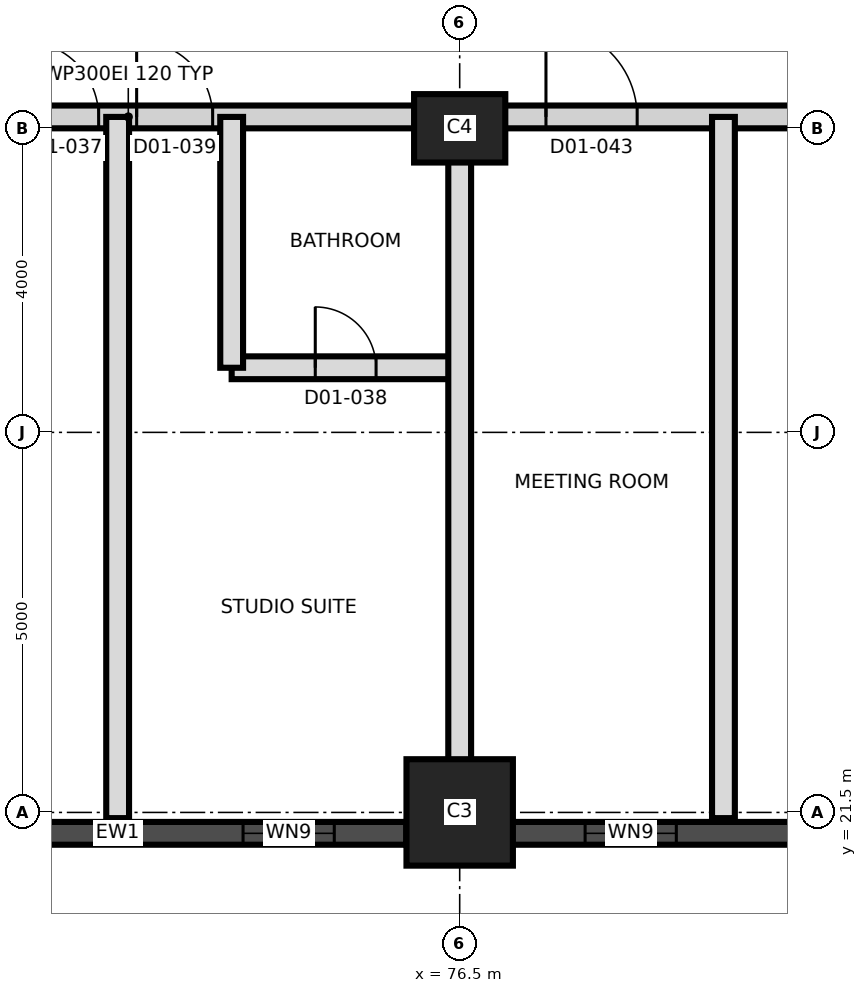
"""IFC4 building model, lengths in metres.
Left out: names, types, materials, properties, quantities, classifications, styles, units other than length and angle.
Written with IfcOpenShell. Run it as: python <this file> out.ifc"""

import sys

from ifc_helpers import new_model, si_unit, direction, frame, frame_2d, origin, origin_2d, place, context, subcontext, project, spatial, rectangle, extrude, element, fill, save


model = new_model("IFC4")
c1 = context("Model", 3, precision=1e-05, world=origin(), true_north=direction((0.0, 1.0)))
c2 = subcontext(c1, "Body", "Model", "MODEL_VIEW")
j1 = project(units=[si_unit("LENGTHUNIT", "METRE"), si_unit("PLANEANGLEUNIT", "RADIAN")], contexts=[c1])
p1 = place(None, origin())
s1 = spatial("IfcSite", under=j1, at=p1, CompositionType="ELEMENT")
p2 = place(p1, origin())
s2 = spatial("IfcBuilding", under=s1, at=p2, CompositionType="ELEMENT")
p3 = place(p2, frame((0.0, 0.0, 40.9)))
s3 = spatial("IfcBuildingStorey", under=s2, at=p3, CompositionType="ELEMENT", Elevation=40.9)
p4 = place(p3, frame((76.5, 21.5, 0.0), z_axis=(0.0, 0.0, 1.0), x_axis=(1.0, 0.0, 0.0)))
e1 = element("IfcColumn", 1, at=p4, inside=s3, PredefinedType="COLUMN", context=c2, shape_type="SweptSolid", body=[
    extrude(rectangle(XDim=1.4, YDim=1.4, at=origin_2d()), origin(), (0.0, 0.0, 1.0), 3.7),
])
p5 = place(p3, frame((76.5, 30.5, 0.0), z_axis=(0.0, 0.0, 1.0), x_axis=(1.0, 0.0, 0.0)))
e2 = element("IfcColumn", 2, at=p5, inside=s3, PredefinedType="COLUMN", context=c2, shape_type="SweptSolid", body=[
    extrude(rectangle(XDim=1.2, YDim=0.9, at=origin_2d()), origin(), (0.0, 0.0, 1.0), 3.7),
])
p6 = place(p3, frame((68.2, 21.225, 0.0), z_axis=(0.0, 0.0, 1.0), x_axis=(1.0, 0.0, 0.0)))
e3 = element("IfcWall", 3, at=p6, inside=s3, PredefinedType="SOLIDWALL", context=c2, shape_type="SweptSolid", body=[
    extrude(rectangle(XDim=7.6, YDim=0.3, at=frame_2d((3.8, 0.0))), origin(), (0.0, 0.0, 1.0), 2.7),
])
p7 = place(p6, frame((0.95, 0.0, 0.9)))
e4 = element("IfcOpeningElement", 4, at=p7, cuts=e3, PredefinedType="OPENING", context=c2, shape_type="SweptSolid", body=[
    extrude(rectangle(XDim=1.2, YDim=1.5, at=frame_2d((0.6, 0.75))), frame((0.0, 0.16, 0.0), z_axis=(0.0, -1.0, 0.0), x_axis=(1.0, 0.0, 0.0)), (0.0, 0.0, 1.0), 0.32),
])
p8 = place(p6, frame((5.45, 0.0, 0.9)))
e5 = element("IfcOpeningElement", 5, at=p8, cuts=e3, PredefinedType="OPENING", context=c2, shape_type="SweptSolid", body=[
    extrude(rectangle(XDim=1.2, YDim=1.5, at=frame_2d((0.6, 0.75))), frame((0.0, 0.16, 0.0), z_axis=(0.0, -1.0, 0.0), x_axis=(1.0, 0.0, 0.0)), (0.0, 0.0, 1.0), 0.32),
])
p9 = place(p3, frame((75.8, 21.225, 0.0), z_axis=(0.0, 0.0, 1.0), x_axis=(1.0, 0.0, 0.0)))
e6 = element("IfcWall", 6, at=p9, inside=s3, PredefinedType="SOLIDWALL", context=c2, shape_type="SweptSolid", body=[
    extrude(rectangle(XDim=11.684, YDim=0.3, at=frame_2d((5.842, 0.0))), origin(), (0.0, 0.0, 1.0), 3.4),
])
p10 = place(p9, frame((2.35, 0.0, 0.9)))
e7 = element("IfcOpeningElement", 7, at=p10, cuts=e6, PredefinedType="OPENING", context=c2, shape_type="SweptSolid", body=[
    extrude(rectangle(XDim=1.2, YDim=1.5, at=frame_2d((0.6, 0.75))), frame((0.0, 0.16, 0.0), z_axis=(0.0, -1.0, 0.0), x_axis=(1.0, 0.0, 0.0)), (0.0, 0.0, 1.0), 0.32),
])
p11 = place(p9, frame((6.85, 0.0, 0.9)))
e8 = element("IfcOpeningElement", 8, at=p11, cuts=e6, PredefinedType="OPENING", context=c2, shape_type="SweptSolid", body=[
    extrude(rectangle(XDim=1.2, YDim=1.5, at=frame_2d((0.6, 0.75))), frame((0.0, 0.16, 0.0), z_axis=(0.0, -1.0, 0.0), x_axis=(1.0, 0.0, 0.0)), (0.0, 0.0, 1.0), 0.32),
])
p12 = place(p3, frame((73.5, 27.35, 0.0), z_axis=(0.0, 0.0, 1.0), x_axis=(1.0, 0.0, 0.0)))
e9 = element("IfcWall", 9, at=p12, inside=s3, PredefinedType="PARTITIONING", context=c2, shape_type="SweptSolid", body=[
    extrude(rectangle(XDim=3.0, YDim=0.3, at=frame_2d((1.5, 0.0))), origin(), (0.0, 0.0, 1.0), 3.4),
])
p13 = place(p12, frame((1.1, 0.0, 0.0)))
e10 = element("IfcOpeningElement", 10, at=p13, cuts=e9, PredefinedType="OPENING", context=c2, shape_type="SweptSolid", body=[
    extrude(rectangle(XDim=0.8, YDim=2.1, at=frame_2d((0.4, 1.05))), frame((0.0, 0.16, 0.0), z_axis=(0.0, -1.0, 0.0), x_axis=(1.0, 0.0, 0.0)), (0.0, 0.0, 1.0), 0.32),
])
p14 = place(p3, frame((58.95, 30.65, 0.0), z_axis=(0.0, 0.0, 1.0), x_axis=(1.0, 0.0, 0.0)))
e11 = element("IfcWall", 11, at=p14, inside=s3, PredefinedType="PARTITIONING", context=c2, shape_type="SweptSolid", body=[
    extrude(rectangle(XDim=26.38, YDim=0.3, at=frame_2d((13.19, 0.0))), origin(), (0.0, 0.0, 1.0), 3.4),
])
p15 = place(p14, frame((2.47, 0.0, 0.0)))
e12 = element("IfcOpeningElement", 12, at=p15, cuts=e11, PredefinedType="OPENING", context=c2, shape_type="SweptSolid", body=[
    extrude(rectangle(XDim=1.0, YDim=2.1, at=frame_2d((0.5, 1.05))), frame((0.0, 0.16, 0.0), z_axis=(0.0, -1.0, 0.0), x_axis=(1.0, 0.0, 0.0)), (0.0, 0.0, 1.0), 0.32),
])
p16 = place(p14, frame((4.27, 0.0, 0.0)))
e13 = element("IfcOpeningElement", 13, at=p16, cuts=e11, PredefinedType="OPENING", context=c2, shape_type="SweptSolid", body=[
    extrude(rectangle(XDim=1.0, YDim=2.1, at=frame_2d((0.5, 1.05))), frame((0.0, 0.16, 0.0), z_axis=(0.0, -1.0, 0.0), x_axis=(1.0, 0.0, 0.0)), (0.0, 0.0, 1.0), 0.32),
])
p17 = place(p14, frame((11.8, 0.0, 0.0)))
e14 = element("IfcOpeningElement", 14, at=p17, cuts=e11, PredefinedType="OPENING", context=c2, shape_type="SweptSolid", body=[
    extrude(rectangle(XDim=1.0, YDim=2.4, at=frame_2d((0.5, 1.2))), frame((0.0, 0.16, 0.0), z_axis=(0.0, -1.0, 0.0), x_axis=(1.0, 0.0, 0.0)), (0.0, 0.0, 1.0), 0.32),
])
p18 = place(p14, frame((13.3, 0.0, 0.0)))
e15 = element("IfcOpeningElement", 15, at=p18, cuts=e11, PredefinedType="OPENING", context=c2, shape_type="SweptSolid", body=[
    extrude(rectangle(XDim=1.0, YDim=2.4, at=frame_2d((0.5, 1.2))), frame((0.0, 0.16, 0.0), z_axis=(0.0, -1.0, 0.0), x_axis=(1.0, 0.0, 0.0)), (0.0, 0.0, 1.0), 0.32),
])
p19 = place(p14, frame((18.685, 0.0, 0.0)))
e16 = element("IfcOpeningElement", 16, at=p19, cuts=e11, PredefinedType="OPENING", context=c2, shape_type="SweptSolid", body=[
    extrude(rectangle(XDim=1.2, YDim=2.1, at=frame_2d((0.6, 1.05))), frame((0.0, 0.16, 0.0), z_axis=(0.0, -1.0, 0.0), x_axis=(1.0, 0.0, 0.0)), (0.0, 0.0, 1.0), 0.32),
])
p20 = place(p14, frame((21.935, 0.0, 0.0)))
e17 = element("IfcOpeningElement", 17, at=p20, cuts=e11, PredefinedType="OPENING", context=c2, shape_type="SweptSolid", body=[
    extrude(rectangle(XDim=1.0, YDim=2.1, at=frame_2d((0.5, 1.05))), frame((0.0, 0.16, 0.0), z_axis=(0.0, -1.0, 0.0), x_axis=(1.0, 0.0, 0.0)), (0.0, 0.0, 1.0), 0.32),
])
p21 = place(p3, frame((72.0, 21.425, 0.0), z_axis=(0.0, 0.0, 1.0), x_axis=(0.0, 1.0, 0.0)))
e18 = element("IfcWall", 18, at=p21, inside=s3, PredefinedType="PARTITIONING", context=c2, shape_type="SweptSolid", body=[
    extrude(rectangle(XDim=9.225, YDim=0.3, at=frame_2d((4.612, 0.0))), origin(), (0.0, 0.0, 1.0), 3.4),
])
p22 = place(p3, frame((73.5, 27.35, 0.0), z_axis=(0.0, 0.0, 1.0), x_axis=(0.0, 1.0, 0.0)))
e19 = element("IfcWall", 19, at=p22, inside=s3, PredefinedType="PARTITIONING", context=c2, shape_type="SweptSolid", body=[
    extrude(rectangle(XDim=3.3, YDim=0.3, at=frame_2d((1.65, 0.0))), origin(), (0.0, 0.0, 1.0), 3.4),
])
for number, where, z_axis, x_axis in (
    (20, (76.5, 21.425, 0.0), (0.0, 0.0, 1.0), (0.0, 1.0, 0.0)),
    (21, (79.97, 21.425, 0.0), (0.0, 0.0, 1.0), (0.0, 1.0, 0.0)),
):
    element("IfcWall", number, at=place(p3, frame(where, z_axis=z_axis, x_axis=x_axis)), inside=s3, PredefinedType="PARTITIONING", context=c2, shape_type="SweptSolid", body=[
        extrude(rectangle(XDim=9.225, YDim=0.3, at=frame_2d((4.612, 0.0))), origin(), (0.0, 0.0, 1.0), 3.4),
    ])
p23 = place(p8, origin())
e22 = element("IfcWindow", 22, at=p23, inside=s3, PartitioningType="SINGLE_PANEL", PredefinedType="WINDOW", context=c2, shape_type="SweptSolid", body=[
    extrude(rectangle(XDim=1.2, YDim=1.5, at=frame_2d((0.6, 0.75))), frame((0.0, 0.03, 0.0), z_axis=(0.0, -1.0, 0.0), x_axis=(1.0, 0.0, 0.0)), (0.0, 0.0, 1.0), 0.06),
])
fill(e5, e22)
p24 = place(p10, origin())
e23 = element("IfcWindow", 23, at=p24, inside=s3, PartitioningType="SINGLE_PANEL", PredefinedType="WINDOW", context=c2, shape_type="SweptSolid", body=[
    extrude(rectangle(XDim=1.2, YDim=1.5, at=frame_2d((0.6, 0.75))), frame((0.0, 0.03, 0.0), z_axis=(0.0, -1.0, 0.0), x_axis=(1.0, 0.0, 0.0)), (0.0, 0.0, 1.0), 0.06),
])
fill(e7, e23)
p25 = place(p17, origin())
e24 = element("IfcDoor", 24, at=p25, inside=s3, OperationType="SINGLE_SWING_LEFT", PredefinedType="DOOR", context=c2, shape_type="SweptSolid", body=[
    extrude(rectangle(XDim=1.0, YDim=2.4, at=frame_2d((0.5, 1.2))), frame((0.0, 0.025, 0.0), z_axis=(0.0, -1.0, 0.0), x_axis=(1.0, 0.0, 0.0)), (0.0, 0.0, 1.0), 0.05),
])
fill(e14, e24)
p26 = place(p13, origin())
e25 = element("IfcDoor", 25, at=p26, inside=s3, OperationType="SINGLE_SWING_LEFT", PredefinedType="DOOR", context=c2, shape_type="SweptSolid", body=[
    extrude(rectangle(XDim=0.8, YDim=2.1, at=frame_2d((0.4, 1.05))), frame((0.0, 0.025, 0.0), z_axis=(0.0, -1.0, 0.0), x_axis=(1.0, 0.0, 0.0)), (0.0, 0.0, 1.0), 0.05),
])
fill(e10, e25)
p27 = place(p18, origin())
e26 = element("IfcDoor", 26, at=p27, inside=s3, OperationType="SINGLE_SWING_RIGHT", PredefinedType="DOOR", context=c2, shape_type="SweptSolid", body=[
    extrude(rectangle(XDim=1.0, YDim=2.4, at=frame_2d((0.5, 1.2))), frame((0.0, 0.025, 0.0), z_axis=(0.0, -1.0, 0.0), x_axis=(1.0, 0.0, 0.0)), (0.0, 0.0, 1.0), 0.05),
])
fill(e15, e26)
p28 = place(p19, origin())
e27 = element("IfcDoor", 27, at=p28, inside=s3, OperationType="SINGLE_SWING_LEFT", PredefinedType="DOOR", context=c2, shape_type="SweptSolid", body=[
    extrude(rectangle(XDim=1.2, YDim=2.1, at=frame_2d((0.6, 1.05))), frame((0.0, 0.025, 0.0), z_axis=(0.0, -1.0, 0.0), x_axis=(1.0, 0.0, 0.0)), (0.0, 0.0, 1.0), 0.05),
])
fill(e16, e27)
save(model, sys.argv[1])
